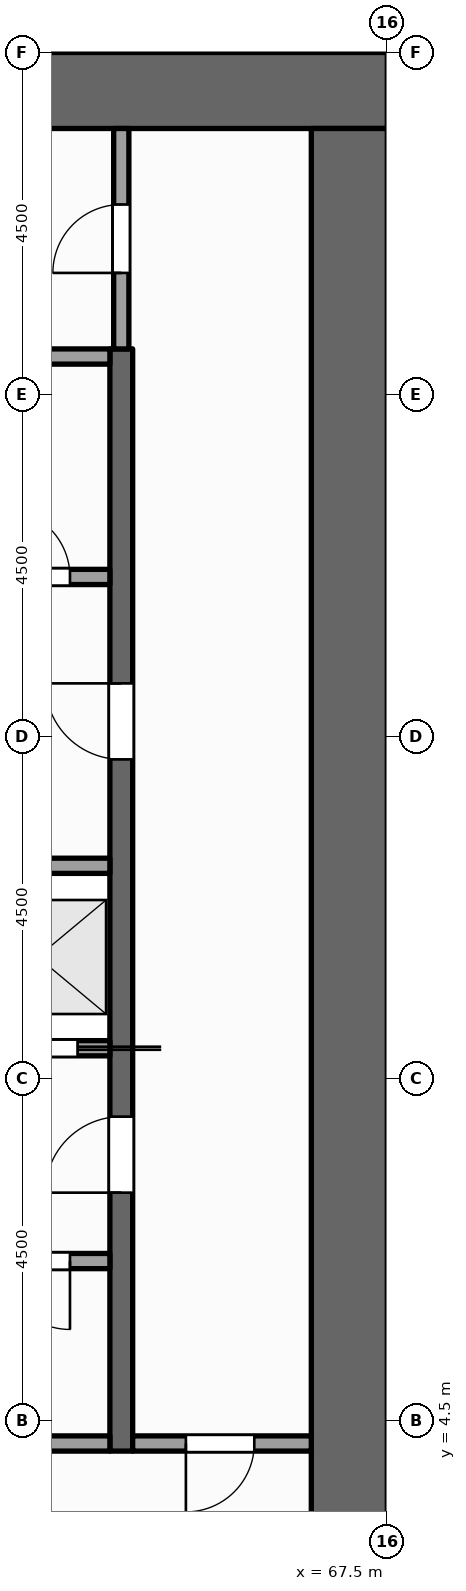
"""IFC4 building model, lengths in metres.
Left out: names, types, materials, properties, quantities, classifications, styles, units other than length and angle.
Written with IfcOpenShell. Run it as: python <this file> out.ifc"""

import sys

from ifc_helpers import new_model, si_unit, direction, frame, frame_2d, origin, place, context, subcontext, project, spatial, rectangle, extrude, element, fill, save


model = new_model("IFC4")
c1 = context("Model", 3, precision=1e-05, world=origin(), true_north=direction((0.0, 1.0)))
c2 = subcontext(c1, "Body", "Model", "MODEL_VIEW")
j1 = project(units=[si_unit("LENGTHUNIT", "METRE"), si_unit("PLANEANGLEUNIT", "RADIAN")], contexts=[c1])
p1 = place(None, origin())
s1 = spatial("IfcSite", under=j1, at=p1, CompositionType="ELEMENT")
p2 = place(p1, origin())
s2 = spatial("IfcBuilding", under=s1, at=p2, CompositionType="ELEMENT")
p3 = place(p2, frame((0.0, 0.0, 143.0)))
s3 = spatial("IfcBuildingStorey", under=s2, at=p3, CompositionType="ELEMENT", Elevation=143.0)
p4 = place(p3, frame((54.0, 22.0, -0.15), z_axis=(0.0, 0.0, 1.0), x_axis=(1.0, 0.0, 0.0)))
e1 = element("IfcWall", 1, at=p4, inside=s3, PredefinedType="SHEAR", context=c2, shape_type="SweptSolid", body=[
    extrude(rectangle(XDim=13.5, YDim=1.0, at=frame_2d((6.75, 0.0))), origin(), (0.0, 0.0, 1.0), 4.0),
])
p5 = place(p3, frame((67.0, 1.0, -0.15), z_axis=(0.0, 0.0, 1.0), x_axis=(0.0, 1.0, 0.0)))
e2 = element("IfcWall", 2, at=p5, inside=s3, PredefinedType="SHEAR", context=c2, shape_type="SweptSolid", body=[
    extrude(rectangle(XDim=20.5, YDim=1.0, at=frame_2d((10.25, 0.0))), origin(), (0.0, 0.0, 1.0), 4.0),
])
p6 = place(p3, frame((64.0, 4.1, 0.0), z_axis=(0.0, 0.0, 1.0), x_axis=(0.0, 1.0, 0.0)))
e3 = element("IfcWall", 3, at=p6, inside=s3, PredefinedType="SHEAR", context=c2, shape_type="SweptSolid", body=[
    extrude(rectangle(XDim=14.5, YDim=0.3, at=frame_2d((7.25, 0.0))), origin(), (0.0, 0.0, 1.0), 3.85),
])
p7 = place(p6, frame((3.4, 0.0, 0.0)))
e4 = element("IfcOpeningElement", 4, at=p7, cuts=e3, PredefinedType="OPENING", context=c2, shape_type="SweptSolid", body=[
    extrude(rectangle(XDim=1.0, YDim=2.1, at=frame_2d((0.5, 1.05))), frame((0.0, 0.16, 0.0), z_axis=(0.0, -1.0, 0.0), x_axis=(1.0, 0.0, 0.0)), (0.0, 0.0, 1.0), 0.32),
])
p8 = place(p6, frame((9.1, 0.0, 0.0)))
e5 = element("IfcOpeningElement", 5, at=p8, cuts=e3, PredefinedType="OPENING", context=c2, shape_type="SweptSolid", body=[
    extrude(rectangle(XDim=1.0, YDim=2.1, at=frame_2d((0.5, 1.05))), frame((0.0, 0.16, 0.0), z_axis=(0.0, -1.0, 0.0), x_axis=(1.0, 0.0, 0.0)), (0.0, 0.0, 1.0), 0.32),
])
p9 = place(p3, frame((64.0, 18.6, 0.0), z_axis=(0.0, 0.0, 1.0), x_axis=(0.0, 1.0, 0.0)))
e6 = element("IfcWall", 6, at=p9, inside=s3, PredefinedType="PARTITIONING", context=c2, shape_type="SweptSolid", body=[
    extrude(rectangle(XDim=2.9, YDim=0.2, at=frame_2d((1.45, 0.0))), origin(), (0.0, 0.0, 1.0), 3.85),
])
p10 = place(p9, frame((1.0, 0.0, 0.0)))
e7 = element("IfcOpeningElement", 7, at=p10, cuts=e6, PredefinedType="OPENING", context=c2, shape_type="SweptSolid", body=[
    extrude(rectangle(XDim=0.9, YDim=2.1, at=frame_2d((0.45, 1.05))), frame((0.0, 0.11, 0.0), z_axis=(0.0, -1.0, 0.0), x_axis=(1.0, 0.0, 0.0)), (0.0, 0.0, 1.0), 0.22),
])
p11 = place(p3, frame((61.9, 4.2, 0.0), z_axis=(0.0, 0.0, 1.0), x_axis=(1.0, 0.0, 0.0)))
e8 = element("IfcWall", 8, at=p11, inside=s3, PredefinedType="PARTITIONING", context=c2, shape_type="SweptSolid", body=[
    extrude(rectangle(XDim=1.95, YDim=0.2, at=frame_2d((0.975, 0.0))), origin(), (0.0, 0.0, 1.0), 3.85),
])
p12 = place(p3, frame((64.15, 4.2, 0.0), z_axis=(0.0, 0.0, 1.0), x_axis=(1.0, 0.0, 0.0)))
e9 = element("IfcWall", 9, at=p12, inside=s3, PredefinedType="PARTITIONING", context=c2, shape_type="SweptSolid", body=[
    extrude(rectangle(XDim=2.35, YDim=0.2, at=frame_2d((1.175, 0.0))), origin(), (0.0, 0.0, 1.0), 3.85),
])
p13 = place(p12, frame((0.7, 0.0, 0.0)))
e10 = element("IfcOpeningElement", 10, at=p13, cuts=e9, PredefinedType="OPENING", context=c2, shape_type="SweptSolid", body=[
    extrude(rectangle(XDim=0.9, YDim=2.1, at=frame_2d((0.45, 1.05))), frame((0.0, 0.11, 0.0), z_axis=(0.0, -1.0, 0.0), x_axis=(1.0, 0.0, 0.0)), (0.0, 0.0, 1.0), 0.22),
])
p14 = place(p3, frame((61.9, 6.6, 0.0), z_axis=(0.0, 0.0, 1.0), x_axis=(1.0, 0.0, 0.0)))
e11 = element("IfcWall", 11, at=p14, inside=s3, PredefinedType="PARTITIONING", context=c2, shape_type="SweptSolid", body=[
    extrude(rectangle(XDim=1.95, YDim=0.2, at=frame_2d((0.975, 0.0))), origin(), (0.0, 0.0, 1.0), 3.85),
])
p15 = place(p14, frame((0.525, 0.0, 0.0)))
e12 = element("IfcOpeningElement", 12, at=p15, cuts=e11, PredefinedType="OPENING", context=c2, shape_type="SweptSolid", body=[
    extrude(rectangle(XDim=0.9, YDim=2.1, at=frame_2d((0.45, 1.05))), frame((0.0, 0.11, 0.0), z_axis=(0.0, -1.0, 0.0), x_axis=(1.0, 0.0, 0.0)), (0.0, 0.0, 1.0), 0.22),
])
p16 = place(p3, frame((61.9, 9.4, 0.0), z_axis=(0.0, 0.0, 1.0), x_axis=(1.0, 0.0, 0.0)))
e13 = element("IfcWall", 13, at=p16, inside=s3, PredefinedType="SOLIDWALL", context=c2, shape_type="SweptSolid", body=[
    extrude(rectangle(XDim=1.95, YDim=0.2, at=frame_2d((0.975, 0.0))), origin(), (0.0, 0.0, 1.0), 3.85),
])
p17 = place(p16, frame((0.425, 0.0, 0.012)))
e14 = element("IfcOpeningElement", 14, at=p17, cuts=e13, PredefinedType="OPENING", context=c2, shape_type="SweptSolid", body=[
    extrude(rectangle(XDim=1.1, YDim=2.1, at=frame_2d((0.55, 1.05))), frame((0.0, 0.11, 0.0), z_axis=(0.0, -1.0, 0.0), x_axis=(1.0, 0.0, 0.0)), (0.0, 0.0, 1.0), 0.22),
])
p18 = place(p3, frame((61.9, 11.8, 0.0), z_axis=(0.0, 0.0, 1.0), x_axis=(1.0, 0.0, 0.0)))
e15 = element("IfcWall", 15, at=p18, inside=s3, PredefinedType="SOLIDWALL", context=c2, shape_type="SweptSolid", body=[
    extrude(rectangle(XDim=1.95, YDim=0.2, at=frame_2d((0.975, 0.0))), origin(), (0.0, 0.0, 1.0), 3.85),
])
p19 = place(p3, frame((61.9, 15.6, 0.0), z_axis=(0.0, 0.0, 1.0), x_axis=(1.0, 0.0, 0.0)))
e16 = element("IfcWall", 16, at=p19, inside=s3, PredefinedType="PARTITIONING", context=c2, shape_type="SweptSolid", body=[
    extrude(rectangle(XDim=1.95, YDim=0.2, at=frame_2d((0.975, 0.0))), origin(), (0.0, 0.0, 1.0), 3.85),
])
p20 = place(p19, frame((0.525, 0.0, 0.0)))
e17 = element("IfcOpeningElement", 17, at=p20, cuts=e16, PredefinedType="OPENING", context=c2, shape_type="SweptSolid", body=[
    extrude(rectangle(XDim=0.9, YDim=2.1, at=frame_2d((0.45, 1.05))), frame((0.0, 0.11, 0.0), z_axis=(0.0, -1.0, 0.0), x_axis=(1.0, 0.0, 0.0)), (0.0, 0.0, 1.0), 0.22),
])
p21 = place(p3, frame((61.9, 18.5, 0.0), z_axis=(0.0, 0.0, 1.0), x_axis=(1.0, 0.0, 0.0)))
e18 = element("IfcWall", 18, at=p21, inside=s3, PredefinedType="PARTITIONING", context=c2, shape_type="SweptSolid", body=[
    extrude(rectangle(XDim=1.95, YDim=0.2, at=frame_2d((0.975, 0.0))), origin(), (0.0, 0.0, 1.0), 3.85),
])
p22 = place(p17, origin())
e19 = element("IfcDoor", 19, at=p22, inside=s3, OperationType="SLIDING_TO_RIGHT", PredefinedType="DOOR", context=c2, shape_type="SweptSolid", body=[
    extrude(rectangle(XDim=1.1, YDim=2.1, at=frame_2d((0.55, 1.05))), frame((0.0, 0.025, 0.0), z_axis=(0.0, -1.0, 0.0), x_axis=(1.0, 0.0, 0.0)), (0.0, 0.0, 1.0), 0.05),
])
fill(e14, e19)
p23 = place(p7, origin())
e20 = element("IfcDoor", 20, at=p23, inside=s3, OperationType="SINGLE_SWING_LEFT", PredefinedType="DOOR", context=c2, shape_type="SweptSolid", body=[
    extrude(rectangle(XDim=1.0, YDim=2.1, at=frame_2d((0.5, 1.05))), frame((0.0, 0.025, 0.0), z_axis=(0.0, -1.0, 0.0), x_axis=(1.0, 0.0, 0.0)), (0.0, 0.0, 1.0), 0.05),
])
fill(e4, e20)
p24 = place(p8, origin())
e21 = element("IfcDoor", 21, at=p24, inside=s3, OperationType="SINGLE_SWING_RIGHT", PredefinedType="DOOR", context=c2, shape_type="SweptSolid", body=[
    extrude(rectangle(XDim=1.0, YDim=2.1, at=frame_2d((0.5, 1.05))), frame((0.0, 0.025, 0.0), z_axis=(0.0, -1.0, 0.0), x_axis=(1.0, 0.0, 0.0)), (0.0, 0.0, 1.0), 0.05),
])
fill(e5, e21)
p25 = place(p13, origin())
e22 = element("IfcDoor", 22, at=p25, inside=s3, OperationType="SINGLE_SWING_LEFT", PredefinedType="DOOR", context=c2, shape_type="SweptSolid", body=[
    extrude(rectangle(XDim=0.9, YDim=2.1, at=frame_2d((0.45, 1.05))), frame((0.0, 0.025, 0.0), z_axis=(0.0, -1.0, 0.0), x_axis=(1.0, 0.0, 0.0)), (0.0, 0.0, 1.0), 0.05),
])
fill(e10, e22)
p26 = place(p10, origin())
e23 = element("IfcDoor", 23, at=p26, inside=s3, OperationType="SINGLE_SWING_LEFT", PredefinedType="DOOR", context=c2, shape_type="SweptSolid", body=[
    extrude(rectangle(XDim=0.9, YDim=2.1, at=frame_2d((0.45, 1.05))), frame((0.0, 0.025, 0.0), z_axis=(0.0, -1.0, 0.0), x_axis=(1.0, 0.0, 0.0)), (0.0, 0.0, 1.0), 0.05),
])
fill(e7, e23)
p27 = place(p15, origin())
e24 = element("IfcDoor", 24, at=p27, inside=s3, OperationType="SINGLE_SWING_RIGHT", PredefinedType="DOOR", context=c2, shape_type="SweptSolid", body=[
    extrude(rectangle(XDim=0.9, YDim=2.1, at=frame_2d((0.45, 1.05))), frame((0.0, 0.025, 0.0), z_axis=(0.0, -1.0, 0.0), x_axis=(1.0, 0.0, 0.0)), (0.0, 0.0, 1.0), 0.05),
])
fill(e12, e24)
p28 = place(p20, origin())
e25 = element("IfcDoor", 25, at=p28, inside=s3, OperationType="SINGLE_SWING_LEFT", PredefinedType="DOOR", context=c2, shape_type="SweptSolid", body=[
    extrude(rectangle(XDim=0.9, YDim=2.1, at=frame_2d((0.45, 1.05))), frame((0.0, 0.025, 0.0), z_axis=(0.0, -1.0, 0.0), x_axis=(1.0, 0.0, 0.0)), (0.0, 0.0, 1.0), 0.05),
])
fill(e17, e25)
save(model, sys.argv[1])
